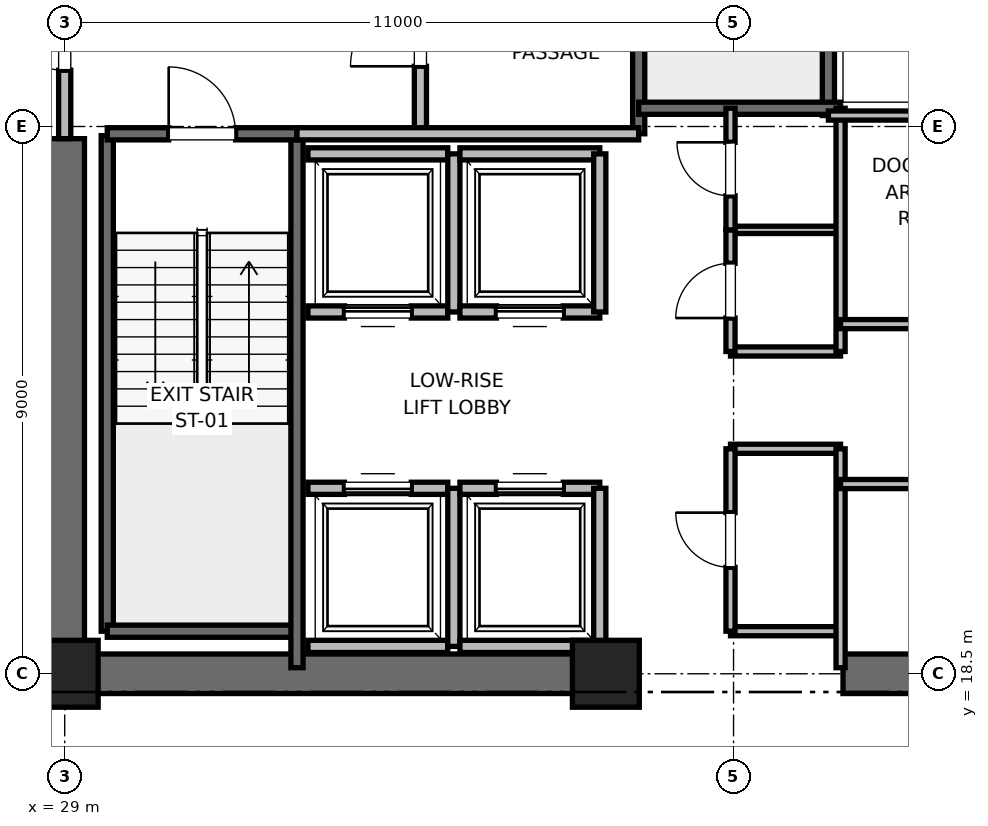
"""IFC4 building model, lengths in metres.
Left out: names, types, materials, properties, quantities, classifications, styles, units other than length and angle.
Written with IfcOpenShell. Run it as: python <this file> out.ifc"""

import sys

from ifc_helpers import new_model, si_unit, direction, frame, frame_2d, origin, origin_2d, place, context, subcontext, project, spatial, rectangle, extrude, element, fill, save


model = new_model("IFC4")
c1 = context("Model", 3, precision=1e-05, world=origin(), true_north=direction((0.0, 1.0)))
c2 = subcontext(c1, "Body", "Model", "MODEL_VIEW")
j1 = project(units=[si_unit("LENGTHUNIT", "METRE"), si_unit("PLANEANGLEUNIT", "RADIAN")], contexts=[c1])
p1 = place(None, origin())
s1 = spatial("IfcSite", under=j1, at=p1, CompositionType="ELEMENT")
p2 = place(p1, origin())
s2 = spatial("IfcBuilding", under=s1, at=p2, CompositionType="ELEMENT")
p3 = place(p2, frame((0.0, 0.0, 67.6)))
s3 = spatial("IfcBuildingStorey", under=s2, at=p3, CompositionType="ELEMENT", Elevation=67.6)
for number, where, z_axis, x_axis in (
    (1, (29.0, 18.5, 0.0), (0.0, 0.0, 1.0), (1.0, 0.0, 0.0)),
    (2, (37.9, 18.5, 0.0), (0.0, 0.0, 1.0), (1.0, 0.0, 0.0)),
):
    element("IfcColumn", number, at=place(p3, frame(where, z_axis=z_axis, x_axis=x_axis)), inside=s3, PredefinedType="PILASTER", context=c2, shape_type="SweptSolid", body=[
        extrude(rectangle(XDim=1.1, YDim=1.1, at=origin_2d()), origin(), (0.0, 0.0, 1.0), 4.0),
    ])
for number, where, z_axis, x_axis in (
    (3, (29.0, 18.5, 0.0), (0.0, 0.0, 1.0), (1.0, 0.0, 0.0)),
    (4, (41.8, 18.5, 0.0), (0.0, 0.0, 1.0), (1.0, 0.0, 0.0)),
):
    element("IfcWall", number, at=place(p3, frame(where, z_axis=z_axis, x_axis=x_axis)), inside=s3, PredefinedType="SHEAR", context=c2, shape_type="SweptSolid", body=[
        extrude(rectangle(XDim=9.2, YDim=0.65, at=frame_2d((4.6, 0.0))), origin(), (0.0, 0.0, 1.0), 3.76),
    ])
p4 = place(p3, frame((29.0, 18.5, 0.0), z_axis=(0.0, 0.0, 1.0), x_axis=(0.0, 1.0, 0.0)))
e5 = element("IfcWall", 5, at=p4, inside=s3, PredefinedType="SHEAR", context=c2, shape_type="SweptSolid", body=[
    extrude(rectangle(XDim=8.8, YDim=0.65, at=frame_2d((4.4, 0.0))), origin(), (0.0, 0.0, 1.0), 3.76),
])
p5 = place(p3, frame((29.7, 19.2, 0.0), z_axis=(0.0, 0.0, 1.0), x_axis=(0.0, 1.0, 0.0)))
e6 = element("IfcWall", 6, at=p5, inside=s3, PredefinedType="SOLIDWALL", context=c2, shape_type="SweptSolid", body=[
    extrude(rectangle(XDim=8.15, YDim=0.2, at=frame_2d((4.075, 0.0))), origin(), (0.0, 0.0, 1.0), 3.76),
])
p6 = place(p3, frame((29.7, 19.2, 0.0), z_axis=(0.0, 0.0, 1.0), x_axis=(1.0, 0.0, 0.0)))
e7 = element("IfcWall", 7, at=p6, inside=s3, PredefinedType="SOLIDWALL", context=c2, shape_type="SweptSolid", body=[
    extrude(rectangle(XDim=3.12, YDim=0.2, at=frame_2d((1.56, 0.0))), origin(), (0.0, 0.0, 1.0), 3.76),
])
p7 = place(p3, frame((32.82, 18.6, 0.0), z_axis=(0.0, 0.0, 1.0), x_axis=(0.0, 1.0, 0.0)))
e8 = element("IfcWall", 8, at=p7, inside=s3, PredefinedType="SOLIDWALL", context=c2, shape_type="SweptSolid", body=[
    extrude(rectangle(XDim=8.78, YDim=0.2, at=frame_2d((4.39, 0.0))), origin(), (0.0, 0.0, 1.0), 3.76),
])
p8 = place(p3, frame((29.7, 27.38, 0.0), z_axis=(0.0, 0.0, 1.0), x_axis=(1.0, 0.0, 0.0)))
e9 = element("IfcWall", 9, at=p8, inside=s3, PredefinedType="SOLIDWALL", context=c2, shape_type="SweptSolid", body=[
    extrude(rectangle(XDim=3.12, YDim=0.2, at=frame_2d((1.56, 0.0))), origin(), (0.0, 0.0, 1.0), 3.76),
])
p9 = place(p8, frame((1.01, 0.0, 0.0)))
e10 = element("IfcOpeningElement", 10, at=p9, cuts=e9, PredefinedType="OPENING", context=c2, shape_type="SweptSolid", body=[
    extrude(rectangle(XDim=1.1, YDim=2.15, at=frame_2d((0.55, 1.075))), frame((0.0, 0.1, 0.0), z_axis=(0.0, -1.0, 0.0), x_axis=(1.0, 0.0, 0.0)), (0.0, 0.0, 1.0), 0.2),
])
p10 = place(p3, frame((38.44, 27.38, 0.0), z_axis=(0.0, 0.0, 1.0), x_axis=(0.0, 1.0, 0.0)))
e11 = element("IfcWall", 11, at=p10, inside=s3, PredefinedType="SOLIDWALL", context=c2, shape_type="SweptSolid", body=[
    extrude(rectangle(XDim=8.87, YDim=0.2, at=frame_2d((4.435, 0.0))), origin(), (0.0, 0.0, 1.0), 3.76),
])
p11 = place(p3, frame((41.56, 27.68, 0.0), z_axis=(0.0, 0.0, 1.0), x_axis=(0.0, 1.0, 0.0)))
e12 = element("IfcWall", 12, at=p11, inside=s3, PredefinedType="SOLIDWALL", context=c2, shape_type="SweptSolid", body=[
    extrude(rectangle(XDim=8.57, YDim=0.2, at=frame_2d((4.285, 0.0))), origin(), (0.0, 0.0, 1.0), 3.76),
])
p12 = place(p3, frame((38.44, 27.8, 0.0), z_axis=(0.0, 0.0, 1.0), x_axis=(1.0, 0.0, 0.0)))
e13 = element("IfcWall", 13, at=p12, inside=s3, PredefinedType="SOLIDWALL", context=c2, shape_type="SweptSolid", body=[
    extrude(rectangle(XDim=3.32, YDim=0.2, at=frame_2d((1.66, 0.0))), origin(), (0.0, 0.0, 1.0), 3.76),
])
p13 = place(p3, frame((34.85, 27.38, 0.0), z_axis=(0.0, 0.0, 1.0), x_axis=(0.0, 1.0, 0.0)))
e14 = element("IfcWall", 14, at=p13, inside=s3, PredefinedType="PARTITIONING", context=c2, shape_type="SweptSolid", body=[
    extrude(rectangle(XDim=3.37, YDim=0.2, at=frame_2d((1.685, 0.0))), origin(), (0.0, 0.0, 1.0), 3.76),
])
p14 = place(p13, frame((1.11, 0.0, 0.0)))
e15 = element("IfcOpeningElement", 15, at=p14, cuts=e14, PredefinedType="OPENING", context=c2, shape_type="SweptSolid", body=[
    extrude(rectangle(XDim=1.15, YDim=2.2, at=frame_2d((0.575, 1.1))), frame((0.0, 0.1, 0.0), z_axis=(0.0, -1.0, 0.0), x_axis=(1.0, 0.0, 0.0)), (0.0, 0.0, 1.0), 0.2),
])
p15 = place(p3, frame((29.0, 27.3, 0.0), z_axis=(0.0, 0.0, 1.0), x_axis=(0.0, 1.0, 0.0)))
e16 = element("IfcWall", 16, at=p15, inside=s3, PredefinedType="PARTITIONING", context=c2, shape_type="SweptSolid", body=[
    extrude(rectangle(XDim=3.4, YDim=0.2, at=frame_2d((1.7, 0.0))), origin(), (0.0, 0.0, 1.0), 2.54),
])
p16 = place(p15, frame((1.125, 0.0, 0.0)))
e17 = element("IfcOpeningElement", 17, at=p16, cuts=e16, PredefinedType="OPENING", context=c2, shape_type="SweptSolid", body=[
    extrude(rectangle(XDim=1.15, YDim=2.2, at=frame_2d((0.575, 1.1))), frame((0.0, 0.1, 0.0), z_axis=(0.0, -1.0, 0.0), x_axis=(1.0, 0.0, 0.0)), (0.0, 0.0, 1.0), 0.2),
])
p17 = place(p3, frame((32.82, 27.38, 0.0), z_axis=(0.0, 0.0, 1.0), x_axis=(1.0, 0.0, 0.0)))
e18 = element("IfcWall", 18, at=p17, inside=s3, PredefinedType="PARTITIONING", context=c2, shape_type="SweptSolid", body=[
    extrude(rectangle(XDim=5.62, YDim=0.2, at=frame_2d((2.81, 0.0))), origin(), (0.0, 0.0, 1.0), 3.76),
])
p18 = place(p3, frame((33.0, 18.95, 0.0), z_axis=(0.0, 0.0, 1.0), x_axis=(1.0, 0.0, 0.0)))
e19 = element("IfcWall", 19, at=p18, inside=s3, PredefinedType="SOLIDWALL", context=c2, shape_type="SweptSolid", body=[
    extrude(rectangle(XDim=2.3, YDim=0.2, at=frame_2d((1.15, 0.0))), origin(), (0.0, 0.0, 1.0), 3.76),
])
p19 = place(p3, frame((35.3, 21.55, 0.0), z_axis=(0.0, 0.0, 1.0), x_axis=(-1.0, 0.0, 0.0)))
e20 = element("IfcWall", 20, at=p19, inside=s3, PredefinedType="SOLIDWALL", context=c2, shape_type="SweptSolid", body=[
    extrude(rectangle(XDim=2.3, YDim=0.2, at=frame_2d((1.15, 0.0))), origin(), (0.0, 0.0, 1.0), 3.76),
])
p20 = place(p19, frame((0.6, 0.0, 0.0)))
e21 = element("IfcOpeningElement", 21, at=p20, cuts=e20, PredefinedType="OPENING", context=c2, shape_type="SweptSolid", body=[
    extrude(rectangle(XDim=1.1, YDim=2.2, at=frame_2d((0.55, 1.1))), frame((0.0, 0.1, 0.0), z_axis=(0.0, -1.0, 0.0), x_axis=(1.0, 0.0, 0.0)), (0.0, 0.0, 1.0), 0.2),
])
p21 = place(p3, frame((35.4, 18.95, 0.0), z_axis=(0.0, 0.0, 1.0), x_axis=(0.0, 1.0, 0.0)))
e22 = element("IfcWall", 22, at=p21, inside=s3, PredefinedType="SOLIDWALL", context=c2, shape_type="SweptSolid", body=[
    extrude(rectangle(XDim=2.6, YDim=0.2, at=frame_2d((1.3, 0.0))), origin(), (0.0, 0.0, 1.0), 3.76),
])
p22 = place(p3, frame((35.5, 18.95, 0.0), z_axis=(0.0, 0.0, 1.0), x_axis=(1.0, 0.0, 0.0)))
e23 = element("IfcWall", 23, at=p22, inside=s3, PredefinedType="SOLIDWALL", context=c2, shape_type="SweptSolid", body=[
    extrude(rectangle(XDim=2.3, YDim=0.2, at=frame_2d((1.15, 0.0))), origin(), (0.0, 0.0, 1.0), 2.54),
])
p23 = place(p3, frame((37.8, 21.55, 0.0), z_axis=(0.0, 0.0, 1.0), x_axis=(-1.0, 0.0, 0.0)))
e24 = element("IfcWall", 24, at=p23, inside=s3, PredefinedType="SOLIDWALL", context=c2, shape_type="SweptSolid", body=[
    extrude(rectangle(XDim=2.3, YDim=0.2, at=frame_2d((1.15, 0.0))), origin(), (0.0, 0.0, 1.0), 3.76),
])
p24 = place(p23, frame((0.6, 0.0, 0.0)))
e25 = element("IfcOpeningElement", 25, at=p24, cuts=e24, PredefinedType="OPENING", context=c2, shape_type="SweptSolid", body=[
    extrude(rectangle(XDim=1.1, YDim=2.2, at=frame_2d((0.55, 1.1))), frame((0.0, 0.1, 0.0), z_axis=(0.0, -1.0, 0.0), x_axis=(1.0, 0.0, 0.0)), (0.0, 0.0, 1.0), 0.2),
])
p25 = place(p3, frame((37.8, 18.95, 0.0), z_axis=(0.0, 0.0, 1.0), x_axis=(0.0, 1.0, 0.0)))
e26 = element("IfcWall", 26, at=p25, inside=s3, PredefinedType="SOLIDWALL", context=c2, shape_type="SweptSolid", body=[
    extrude(rectangle(XDim=2.6, YDim=0.2, at=frame_2d((1.3, 0.0))), origin(), (0.0, 0.0, 1.0), 2.54),
])
p26 = place(p3, frame((33.0, 24.45, 0.0), z_axis=(0.0, 0.0, 1.0), x_axis=(1.0, 0.0, 0.0)))
e27 = element("IfcWall", 27, at=p26, inside=s3, PredefinedType="SOLIDWALL", context=c2, shape_type="SweptSolid", body=[
    extrude(rectangle(XDim=2.3, YDim=0.2, at=frame_2d((1.15, 0.0))), origin(), (0.0, 0.0, 1.0), 3.76),
])
p27 = place(p26, frame((0.6, 0.0, 0.0)))
e28 = element("IfcOpeningElement", 28, at=p27, cuts=e27, PredefinedType="OPENING", context=c2, shape_type="SweptSolid", body=[
    extrude(rectangle(XDim=1.1, YDim=2.2, at=frame_2d((0.55, 1.1))), frame((0.0, 0.1, 0.0), z_axis=(0.0, -1.0, 0.0), x_axis=(1.0, 0.0, 0.0)), (0.0, 0.0, 1.0), 0.2),
])
p28 = place(p3, frame((35.3, 27.05, 0.0), z_axis=(0.0, 0.0, 1.0), x_axis=(-1.0, 0.0, 0.0)))
e29 = element("IfcWall", 29, at=p28, inside=s3, PredefinedType="SOLIDWALL", context=c2, shape_type="SweptSolid", body=[
    extrude(rectangle(XDim=2.3, YDim=0.2, at=frame_2d((1.15, 0.0))), origin(), (0.0, 0.0, 1.0), 3.76),
])
p29 = place(p3, frame((35.4, 24.45, 0.0), z_axis=(0.0, 0.0, 1.0), x_axis=(0.0, 1.0, 0.0)))
e30 = element("IfcWall", 30, at=p29, inside=s3, PredefinedType="SOLIDWALL", context=c2, shape_type="SweptSolid", body=[
    extrude(rectangle(XDim=2.6, YDim=0.2, at=frame_2d((1.3, 0.0))), origin(), (0.0, 0.0, 1.0), 3.76),
])
p30 = place(p3, frame((35.5, 24.45, 0.0), z_axis=(0.0, 0.0, 1.0), x_axis=(1.0, 0.0, 0.0)))
e31 = element("IfcWall", 31, at=p30, inside=s3, PredefinedType="SOLIDWALL", context=c2, shape_type="SweptSolid", body=[
    extrude(rectangle(XDim=2.3, YDim=0.2, at=frame_2d((1.15, 0.0))), origin(), (0.0, 0.0, 1.0), 3.76),
])
p31 = place(p30, frame((0.6, 0.0, 0.0)))
e32 = element("IfcOpeningElement", 32, at=p31, cuts=e31, PredefinedType="OPENING", context=c2, shape_type="SweptSolid", body=[
    extrude(rectangle(XDim=1.1, YDim=2.2, at=frame_2d((0.55, 1.1))), frame((0.0, 0.1, 0.0), z_axis=(0.0, -1.0, 0.0), x_axis=(1.0, 0.0, 0.0)), (0.0, 0.0, 1.0), 0.2),
])
p32 = place(p3, frame((37.8, 27.05, 0.0), z_axis=(0.0, 0.0, 1.0), x_axis=(-1.0, 0.0, 0.0)))
e33 = element("IfcWall", 33, at=p32, inside=s3, PredefinedType="SOLIDWALL", context=c2, shape_type="SweptSolid", body=[
    extrude(rectangle(XDim=2.3, YDim=0.2, at=frame_2d((1.15, 0.0))), origin(), (0.0, 0.0, 1.0), 3.76),
])
p33 = place(p3, frame((37.8, 24.45, 0.0), z_axis=(0.0, 0.0, 1.0), x_axis=(0.0, 1.0, 0.0)))
e34 = element("IfcWall", 34, at=p33, inside=s3, PredefinedType="SOLIDWALL", context=c2, shape_type="SweptSolid", body=[
    extrude(rectangle(XDim=2.6, YDim=0.2, at=frame_2d((1.3, 0.0))), origin(), (0.0, 0.0, 1.0), 3.76),
])
for number, where, z_axis, x_axis in (
    (35, (39.95, 19.2, 0.0), (0.0, 0.0, 1.0), (1.0, 0.0, 0.0)),
    (36, (39.95, 22.2, 0.0), (0.0, 0.0, 1.0), (1.0, 0.0, 0.0)),
    (37, (39.95, 23.8, 0.0), (0.0, 0.0, 1.0), (1.0, 0.0, 0.0)),
):
    element("IfcWall", number, at=place(p3, frame(where, z_axis=z_axis, x_axis=x_axis)), inside=s3, PredefinedType="PARTITIONING", context=c2, shape_type="SweptSolid", body=[
        extrude(rectangle(XDim=1.81, YDim=0.15, at=frame_2d((0.905, 0.0))), origin(), (0.0, 0.0, 1.0), 2.85),
    ])
p34 = place(p3, frame((39.95, 25.8, 0.0), z_axis=(0.0, 0.0, 1.0), x_axis=(1.0, 0.0, 0.0)))
e38 = element("IfcWall", 38, at=p34, inside=s3, PredefinedType="PARTITIONING", context=c2, shape_type="SweptSolid", body=[
    extrude(rectangle(XDim=1.81, YDim=0.12, at=frame_2d((0.905, 0.0))), origin(), (0.0, 0.0, 1.0), 2.85),
])
p35 = place(p3, frame((41.76, 18.6, 0.0), z_axis=(0.0, 0.0, 1.0), x_axis=(0.0, 1.0, 0.0)))
e39 = element("IfcWall", 39, at=p35, inside=s3, PredefinedType="PARTITIONING", context=c2, shape_type="SweptSolid", body=[
    extrude(rectangle(XDim=3.6, YDim=0.15, at=frame_2d((1.8, 0.0))), origin(), (0.0, 0.0, 1.0), 2.54),
])
p36 = place(p3, frame((41.76, 23.8, 0.0), z_axis=(0.0, 0.0, 1.0), x_axis=(0.0, 1.0, 0.0)))
e40 = element("IfcWall", 40, at=p36, inside=s3, PredefinedType="PARTITIONING", context=c2, shape_type="SweptSolid", body=[
    extrude(rectangle(XDim=4.0, YDim=0.15, at=frame_2d((2.0, 0.0))), origin(), (0.0, 0.0, 1.0), 2.85),
])
p37 = place(p3, frame((39.95, 19.2, 0.0), z_axis=(0.0, 0.0, 1.0), x_axis=(0.0, 1.0, 0.0)))
e41 = element("IfcWall", 41, at=p37, inside=s3, PredefinedType="PARTITIONING", context=c2, shape_type="SweptSolid", body=[
    extrude(rectangle(XDim=3.0, YDim=0.15, at=frame_2d((1.5, 0.0))), origin(), (0.0, 0.0, 1.0), 2.85),
])
p38 = place(p37, frame((1.05, 0.0, 0.0)))
e42 = element("IfcOpeningElement", 42, at=p38, cuts=e41, PredefinedType="OPENING", context=c2, shape_type="SweptSolid", body=[
    extrude(rectangle(XDim=0.9, YDim=2.1, at=frame_2d((0.45, 1.05))), frame((0.0, 0.075, 0.0), z_axis=(0.0, -1.0, 0.0), x_axis=(1.0, 0.0, 0.0)), (0.0, 0.0, 1.0), 0.15),
])
p39 = place(p3, frame((39.95, 23.8, 0.0), z_axis=(0.0, 0.0, 1.0), x_axis=(0.0, 1.0, 0.0)))
e43 = element("IfcWall", 43, at=p39, inside=s3, PredefinedType="PARTITIONING", context=c2, shape_type="SweptSolid", body=[
    extrude(rectangle(XDim=2.0, YDim=0.15, at=frame_2d((1.0, 0.0))), origin(), (0.0, 0.0, 1.0), 2.85),
])
p40 = place(p39, frame((0.55, 0.0, 0.0)))
e44 = element("IfcOpeningElement", 44, at=p40, cuts=e43, PredefinedType="OPENING", context=c2, shape_type="SweptSolid", body=[
    extrude(rectangle(XDim=0.9, YDim=2.1, at=frame_2d((0.45, 1.05))), frame((0.0, 0.075, 0.0), z_axis=(0.0, -1.0, 0.0), x_axis=(1.0, 0.0, 0.0)), (0.0, 0.0, 1.0), 0.15),
])
p41 = place(p3, frame((39.95, 25.8, 0.0), z_axis=(0.0, 0.0, 1.0), x_axis=(0.0, 1.0, 0.0)))
e45 = element("IfcWall", 45, at=p41, inside=s3, PredefinedType="PARTITIONING", context=c2, shape_type="SweptSolid", body=[
    extrude(rectangle(XDim=2.0, YDim=0.15, at=frame_2d((1.0, 0.0))), origin(), (0.0, 0.0, 1.0), 2.85),
])
p42 = place(p41, frame((0.56, 0.0, 0.0)))
e46 = element("IfcOpeningElement", 46, at=p42, cuts=e45, PredefinedType="OPENING", context=c2, shape_type="SweptSolid", body=[
    extrude(rectangle(XDim=0.88, YDim=2.1, at=frame_2d((0.44, 1.05))), frame((0.0, 0.075, 0.0), z_axis=(0.0, -1.0, 0.0), x_axis=(1.0, 0.0, 0.0)), (0.0, 0.0, 1.0), 0.15),
])
p43 = place(p3, frame((41.56, 27.68, 0.0), z_axis=(0.0, 0.0, 1.0), x_axis=(1.0, 0.0, 0.0)))
e47 = element("IfcWall", 47, at=p43, inside=s3, PredefinedType="PARTITIONING", context=c2, shape_type="SweptSolid", body=[
    extrude(rectangle(XDim=3.59, YDim=0.15, at=frame_2d((1.795, 0.0))), origin(), (0.0, 0.0, 1.0), 2.85),
])
p44 = place(p3, frame((41.76, 21.62, 0.0), z_axis=(0.0, 0.0, 1.0), x_axis=(1.0, 0.0, 0.0)))
e48 = element("IfcWall", 48, at=p44, inside=s3, PredefinedType="PARTITIONING", context=c2, shape_type="SweptSolid", body=[
    extrude(rectangle(XDim=5.98, YDim=0.15, at=frame_2d((2.99, 0.0))), origin(), (0.0, 0.0, 1.0), 2.85),
])
p45 = place(p44, frame((2.49, 0.0, 0.0)))
e49 = element("IfcOpeningElement", 49, at=p45, cuts=e48, PredefinedType="OPENING", context=c2, shape_type="SweptSolid", body=[
    extrude(rectangle(XDim=1.0, YDim=2.15, at=frame_2d((0.5, 1.075))), frame((0.0, 0.075, 0.0), z_axis=(0.0, -1.0, 0.0), x_axis=(1.0, 0.0, 0.0)), (0.0, 0.0, 1.0), 0.15),
])
p46 = place(p3, frame((41.76, 24.25, 0.0), z_axis=(0.0, 0.0, 1.0), x_axis=(1.0, 0.0, 0.0)))
e50 = element("IfcWall", 50, at=p46, inside=s3, PredefinedType="PARTITIONING", context=c2, shape_type="SweptSolid", body=[
    extrude(rectangle(XDim=3.39, YDim=0.15, at=frame_2d((1.695, 0.0))), origin(), (0.0, 0.0, 1.0), 2.85),
])
p47 = place(p46, frame((1.195, 0.0, 0.0)))
e51 = element("IfcOpeningElement", 51, at=p47, cuts=e50, PredefinedType="OPENING", context=c2, shape_type="SweptSolid", body=[
    extrude(rectangle(XDim=1.0, YDim=2.15, at=frame_2d((0.5, 1.075))), frame((0.0, 0.075, 0.0), z_axis=(0.0, -1.0, 0.0), x_axis=(1.0, 0.0, 0.0)), (0.0, 0.0, 1.0), 0.15),
])
p48 = place(p9, origin())
e52 = element("IfcDoor", 52, at=p48, inside=s3, OperationType="SINGLE_SWING_LEFT", PredefinedType="DOOR", context=c2, shape_type="SweptSolid", body=[
    extrude(rectangle(XDim=1.1, YDim=2.15, at=frame_2d((0.55, 1.075))), frame((0.0, 0.025, 0.0), z_axis=(0.0, -1.0, 0.0), x_axis=(1.0, 0.0, 0.0)), (0.0, 0.0, 1.0), 0.05),
])
fill(e10, e52)
p49 = place(p14, origin())
e53 = element("IfcDoor", 53, at=p49, inside=s3, OperationType="SINGLE_SWING_LEFT", PredefinedType="DOOR", context=c2, shape_type="SweptSolid", body=[
    extrude(rectangle(XDim=1.15, YDim=2.2, at=frame_2d((0.575, 1.1))), frame((0.0, 0.025, 0.0), z_axis=(0.0, -1.0, 0.0), x_axis=(1.0, 0.0, 0.0)), (0.0, 0.0, 1.0), 0.05),
])
fill(e15, e53)
p50 = place(p16, origin())
e54 = element("IfcDoor", 54, at=p50, inside=s3, OperationType="SINGLE_SWING_RIGHT", PredefinedType="DOOR", context=c2, shape_type="SweptSolid", body=[
    extrude(rectangle(XDim=1.15, YDim=2.2, at=frame_2d((0.575, 1.1))), frame((0.0, 0.025, 0.0), z_axis=(0.0, -1.0, 0.0), x_axis=(1.0, 0.0, 0.0)), (0.0, 0.0, 1.0), 0.05),
])
fill(e17, e54)
p51 = place(p20, origin())
e55 = element("IfcDoor", 55, at=p51, inside=s3, OperationType="SLIDING_TO_RIGHT", PredefinedType="DOOR", context=c2, shape_type="SweptSolid", body=[
    extrude(rectangle(XDim=1.1, YDim=2.2, at=frame_2d((0.55, 1.1))), frame((0.0, 0.025, 0.0), z_axis=(0.0, -1.0, 0.0), x_axis=(1.0, 0.0, 0.0)), (0.0, 0.0, 1.0), 0.05),
])
fill(e21, e55)
p52 = place(p24, origin())
e56 = element("IfcDoor", 56, at=p52, inside=s3, OperationType="SLIDING_TO_RIGHT", PredefinedType="DOOR", context=c2, shape_type="SweptSolid", body=[
    extrude(rectangle(XDim=1.1, YDim=2.2, at=frame_2d((0.55, 1.1))), frame((0.0, 0.025, 0.0), z_axis=(0.0, -1.0, 0.0), x_axis=(1.0, 0.0, 0.0)), (0.0, 0.0, 1.0), 0.05),
])
fill(e25, e56)
p53 = place(p27, origin())
e57 = element("IfcDoor", 57, at=p53, inside=s3, OperationType="SLIDING_TO_RIGHT", PredefinedType="DOOR", context=c2, shape_type="SweptSolid", body=[
    extrude(rectangle(XDim=1.1, YDim=2.2, at=frame_2d((0.55, 1.1))), frame((0.0, 0.025, 0.0), z_axis=(0.0, -1.0, 0.0), x_axis=(1.0, 0.0, 0.0)), (0.0, 0.0, 1.0), 0.05),
])
fill(e28, e57)
p54 = place(p31, origin())
e58 = element("IfcDoor", 58, at=p54, inside=s3, OperationType="SLIDING_TO_RIGHT", PredefinedType="DOOR", context=c2, shape_type="SweptSolid", body=[
    extrude(rectangle(XDim=1.1, YDim=2.2, at=frame_2d((0.55, 1.1))), frame((0.0, 0.025, 0.0), z_axis=(0.0, -1.0, 0.0), x_axis=(1.0, 0.0, 0.0)), (0.0, 0.0, 1.0), 0.05),
])
fill(e32, e58)
p55 = place(p38, origin())
e59 = element("IfcDoor", 59, at=p55, inside=s3, OperationType="SINGLE_SWING_RIGHT", PredefinedType="DOOR", context=c2, shape_type="SweptSolid", body=[
    extrude(rectangle(XDim=0.9, YDim=2.1, at=frame_2d((0.45, 1.05))), frame((0.0, 0.025, 0.0), z_axis=(0.0, -1.0, 0.0), x_axis=(1.0, 0.0, 0.0)), (0.0, 0.0, 1.0), 0.05),
])
fill(e42, e59)
p56 = place(p40, origin())
e60 = element("IfcDoor", 60, at=p56, inside=s3, OperationType="SINGLE_SWING_LEFT", PredefinedType="DOOR", context=c2, shape_type="SweptSolid", body=[
    extrude(rectangle(XDim=0.9, YDim=2.1, at=frame_2d((0.45, 1.05))), frame((0.0, 0.025, 0.0), z_axis=(0.0, -1.0, 0.0), x_axis=(1.0, 0.0, 0.0)), (0.0, 0.0, 1.0), 0.05),
])
fill(e44, e60)
p57 = place(p42, origin())
e61 = element("IfcDoor", 61, at=p57, inside=s3, OperationType="SINGLE_SWING_RIGHT", PredefinedType="DOOR", context=c2, shape_type="SweptSolid", body=[
    extrude(rectangle(XDim=0.88, YDim=2.1, at=frame_2d((0.44, 1.05))), frame((0.0, 0.025, 0.0), z_axis=(0.0, -1.0, 0.0), x_axis=(1.0, 0.0, 0.0)), (0.0, 0.0, 1.0), 0.05),
])
fill(e46, e61)
save(model, sys.argv[1])
